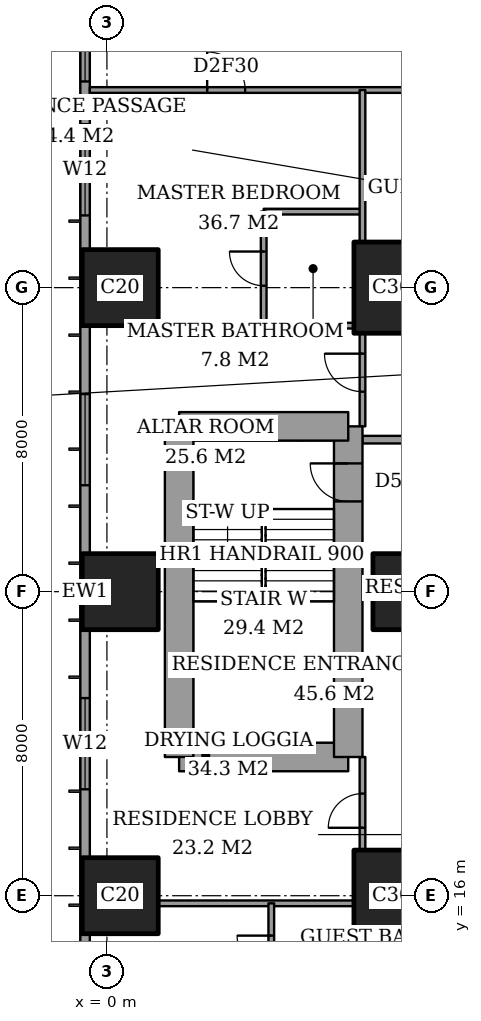
"""IFC4 building model, lengths in metres.
Left out: names, types, materials, properties, quantities, classifications, styles, units other than length and angle.
Written with IfcOpenShell. Run it as: python <this file> out.ifc"""

import sys

from ifc_helpers import new_model, si_unit, direction, frame, frame_2d, origin, origin_2d, place, context, subcontext, project, spatial, rectangle, extrude, element, fill, save


model = new_model("IFC4")
c1 = context("Model", 3, precision=1e-05, world=origin(), true_north=direction((0.0, 1.0)))
c2 = subcontext(c1, "Body", "Model", "MODEL_VIEW")
j1 = project(units=[si_unit("LENGTHUNIT", "METRE"), si_unit("PLANEANGLEUNIT", "RADIAN")], contexts=[c1])
p1 = place(None, origin())
s1 = spatial("IfcSite", under=j1, at=p1, CompositionType="ELEMENT")
p2 = place(p1, origin())
s2 = spatial("IfcBuilding", under=s1, at=p2, CompositionType="ELEMENT")
p3 = place(p2, frame((0.0, 0.0, 110.6)))
s3 = spatial("IfcBuildingStorey", under=s2, at=p3, CompositionType="ELEMENT", Elevation=110.6)
for number, where, z_axis, x_axis in (
    (1, (0.35, 16.0, 0.0), (0.0, 0.0, 1.0), (1.0, 0.0, 0.0)),
    (2, (0.35, 24.0, 0.0), (0.0, 0.0, 1.0), (1.0, 0.0, 0.0)),
    (3, (0.35, 32.0, 0.0), (0.0, 0.0, 1.0), (1.0, 0.0, 0.0)),
):
    element("IfcColumn", number, at=place(p3, frame(where, z_axis=z_axis, x_axis=x_axis)), inside=s3, PredefinedType="COLUMN", context=c2, shape_type="SweptSolid", body=[
        extrude(rectangle(XDim=2.0, YDim=2.0, at=origin_2d()), origin(), (0.0, 0.0, 1.0), 3.6),
    ])
p4 = place(p3, frame((8.0, 16.0, 0.0), z_axis=(0.0, 0.0, 1.0), x_axis=(1.0, 0.0, 0.0)))
e4 = element("IfcColumn", 4, at=p4, inside=s3, PredefinedType="COLUMN", context=c2, shape_type="SweptSolid", body=[
    extrude(rectangle(XDim=3.0, YDim=2.4, at=origin_2d()), origin(), (0.0, 0.0, 1.0), 3.6),
])
p5 = place(p3, frame((8.0, 24.0, 0.0), z_axis=(0.0, 0.0, 1.0), x_axis=(1.0, 0.0, 0.0)))
e5 = element("IfcColumn", 5, at=p5, inside=s3, PredefinedType="COLUMN", context=c2, shape_type="SweptSolid", body=[
    extrude(rectangle(XDim=2.0, YDim=2.0, at=origin_2d()), origin(), (0.0, 0.0, 1.0), 3.6),
])
p6 = place(p3, frame((8.0, 32.0, 0.0), z_axis=(0.0, 0.0, 1.0), x_axis=(1.0, 0.0, 0.0)))
e6 = element("IfcColumn", 6, at=p6, inside=s3, PredefinedType="COLUMN", context=c2, shape_type="SweptSolid", body=[
    extrude(rectangle(XDim=3.0, YDim=2.4, at=origin_2d()), origin(), (0.0, 0.0, 1.0), 3.6),
])
p7 = place(p3, frame((1.9, 19.65, 0.0), z_axis=(0.0, 0.0, 1.0), x_axis=(1.0, 0.0, 0.0)))
e7 = element("IfcWall", 7, at=p7, inside=s3, PredefinedType="SHEAR", context=c2, shape_type="SweptSolid", body=[
    extrude(rectangle(XDim=4.45, YDim=0.75, at=frame_2d((2.225, 0.0))), origin(), (0.0, 0.0, 1.0), 3.6),
])
p8 = place(p3, frame((6.35, 19.65, 0.0), z_axis=(0.0, 0.0, 1.0), x_axis=(0.0, 1.0, 0.0)))
e8 = element("IfcWall", 8, at=p8, inside=s3, PredefinedType="SHEAR", context=c2, shape_type="SweptSolid", body=[
    extrude(rectangle(XDim=8.7, YDim=0.75, at=frame_2d((4.35, 0.0))), origin(), (0.0, 0.0, 1.0), 3.6),
])
p9 = place(p8, frame((6.725, 0.0, 0.0)))
e9 = element("IfcOpeningElement", 9, at=p9, cuts=e8, PredefinedType="OPENING", context=c2, shape_type="SweptSolid", body=[
    extrude(rectangle(XDim=1.0, YDim=2.1, at=frame_2d((0.5, 1.05))), frame((0.0, 0.385, 0.0), z_axis=(0.0, -1.0, 0.0), x_axis=(1.0, 0.0, 0.0)), (0.0, 0.0, 1.0), 0.77),
])
p10 = place(p3, frame((6.35, 28.35, 0.0), z_axis=(0.0, 0.0, 1.0), x_axis=(-1.0, 0.0, 0.0)))
e10 = element("IfcWall", 10, at=p10, inside=s3, PredefinedType="SHEAR", context=c2, shape_type="SweptSolid", body=[
    extrude(rectangle(XDim=4.45, YDim=0.75, at=frame_2d((2.225, 0.0))), origin(), (0.0, 0.0, 1.0), 3.6),
])
p11 = place(p3, frame((1.9, 28.35, 0.0), z_axis=(0.0, 0.0, 1.0), x_axis=(0.0, -1.0, 0.0)))
e11 = element("IfcWall", 11, at=p11, inside=s3, PredefinedType="SHEAR", context=c2, shape_type="SweptSolid", body=[
    extrude(rectangle(XDim=8.7, YDim=0.75, at=frame_2d((4.35, 0.0))), origin(), (0.0, 0.0, 1.0), 3.6),
])
p12 = place(p3, frame((-0.575, 44.825, 0.0), z_axis=(0.0, 0.0, 1.0), x_axis=(0.0, -1.0, 0.0)))
e12 = element("IfcWall", 12, at=p12, inside=s3, PredefinedType="SOLIDWALL", context=c2, shape_type="SweptSolid", body=[
    extrude(rectangle(XDim=41.65, YDim=0.25, at=frame_2d((20.825, 0.0))), origin(), (0.0, 0.0, 1.0), 3.6),
])
p13 = place(p12, frame((0.775, 0.0, 0.4)))
e13 = element("IfcOpeningElement", 13, at=p13, cuts=e12, PredefinedType="OPENING", context=c2, shape_type="SweptSolid", body=[
    extrude(rectangle(XDim=2.4, YDim=2.2, at=frame_2d((1.2, 1.1))), frame((0.0, 0.135, 0.0), z_axis=(0.0, -1.0, 0.0), x_axis=(1.0, 0.0, 0.0)), (0.0, 0.0, 1.0), 0.27),
])
p14 = place(p12, frame((6.2, 0.0, 0.4)))
e14 = element("IfcOpeningElement", 14, at=p14, cuts=e12, PredefinedType="OPENING", context=c2, shape_type="SweptSolid", body=[
    extrude(rectangle(XDim=1.2, YDim=2.2, at=frame_2d((0.6, 1.1))), frame((0.0, 0.135, 0.0), z_axis=(0.0, -1.0, 0.0), x_axis=(1.0, 0.0, 0.0)), (0.0, 0.0, 1.0), 0.27),
])
p15 = place(p12, frame((8.525, 0.0, 0.4)))
e15 = element("IfcOpeningElement", 15, at=p15, cuts=e12, PredefinedType="OPENING", context=c2, shape_type="SweptSolid", body=[
    extrude(rectangle(XDim=2.4, YDim=2.2, at=frame_2d((1.2, 1.1))), frame((0.0, 0.135, 0.0), z_axis=(0.0, -1.0, 0.0), x_axis=(1.0, 0.0, 0.0)), (0.0, 0.0, 1.0), 0.27),
])
p16 = place(p12, frame((15.625, 0.0, 0.4)))
e16 = element("IfcOpeningElement", 16, at=p16, cuts=e12, PredefinedType="OPENING", context=c2, shape_type="SweptSolid", body=[
    extrude(rectangle(XDim=2.4, YDim=2.2, at=frame_2d((1.2, 1.1))), frame((0.0, 0.135, 0.0), z_axis=(0.0, -1.0, 0.0), x_axis=(1.0, 0.0, 0.0)), (0.0, 0.0, 1.0), 0.27),
])
p17 = place(p12, frame((23.625, 0.0, 0.4)))
e17 = element("IfcOpeningElement", 17, at=p17, cuts=e12, PredefinedType="OPENING", context=c2, shape_type="SweptSolid", body=[
    extrude(rectangle(XDim=2.4, YDim=2.2, at=frame_2d((1.2, 1.1))), frame((0.0, 0.135, 0.0), z_axis=(0.0, -1.0, 0.0), x_axis=(1.0, 0.0, 0.0)), (0.0, 0.0, 1.0), 0.27),
])
p18 = place(p12, frame((30.825, 0.0, 0.4)))
e18 = element("IfcOpeningElement", 18, at=p18, cuts=e12, PredefinedType="OPENING", context=c2, shape_type="SweptSolid", body=[
    extrude(rectangle(XDim=2.4, YDim=2.2, at=frame_2d((1.2, 1.1))), frame((0.0, 0.135, 0.0), z_axis=(0.0, -1.0, 0.0), x_axis=(1.0, 0.0, 0.0)), (0.0, 0.0, 1.0), 0.27),
])
p19 = place(p12, frame((34.5, 0.0, 0.4)))
e19 = element("IfcOpeningElement", 19, at=p19, cuts=e12, PredefinedType="OPENING", context=c2, shape_type="SweptSolid", body=[
    extrude(rectangle(XDim=1.2, YDim=2.2, at=frame_2d((0.6, 1.1))), frame((0.0, 0.135, 0.0), z_axis=(0.0, -1.0, 0.0), x_axis=(1.0, 0.0, 0.0)), (0.0, 0.0, 1.0), 0.27),
])
p20 = place(p12, frame((38.475, 0.0, 0.4)))
e20 = element("IfcOpeningElement", 20, at=p20, cuts=e12, PredefinedType="OPENING", context=c2, shape_type="SweptSolid", body=[
    extrude(rectangle(XDim=2.4, YDim=2.2, at=frame_2d((1.2, 1.1))), frame((0.0, 0.135, 0.0), z_axis=(0.0, -1.0, 0.0), x_axis=(1.0, 0.0, 0.0)), (0.0, 0.0, 1.0), 0.27),
])
p21 = place(p3, frame((1.35, 15.8, 0.0), z_axis=(0.0, 0.0, 1.0), x_axis=(1.0, 0.0, 0.0)))
e21 = element("IfcWall", 21, at=p21, inside=s3, PredefinedType="PARTITIONING", context=c2, shape_type="SweptSolid", body=[
    extrude(rectangle(XDim=5.15, YDim=0.15, at=frame_2d((2.575, 0.0))), origin(), (0.0, 0.0, 1.0), 3.35),
])
p22 = place(p3, frame((6.725, 28.0, 0.0), z_axis=(0.0, 0.0, 1.0), x_axis=(1.0, 0.0, 0.0)))
e22 = element("IfcWall", 22, at=p22, inside=s3, PredefinedType="PARTITIONING", context=c2, shape_type="SweptSolid", body=[
    extrude(rectangle(XDim=17.275, YDim=0.2, at=frame_2d((8.637, 0.0))), origin(), (0.0, 0.0, 1.0), 3.35),
])
p23 = place(p22, frame((7.175, 0.0, 0.0)))
e23 = element("IfcOpeningElement", 23, at=p23, cuts=e22, PredefinedType="OPENING", context=c2, shape_type="SweptSolid", body=[
    extrude(rectangle(XDim=1.2, YDim=2.4, at=frame_2d((0.6, 1.2))), frame((0.0, 0.11, 0.0), z_axis=(0.0, -1.0, 0.0), x_axis=(1.0, 0.0, 0.0)), (0.0, 0.0, 1.0), 0.22),
])
p24 = place(p3, frame((1.35, 31.0, 0.0), z_axis=(0.0, 0.0, 1.0), x_axis=(1.0, 0.0, 0.0)))
e24 = element("IfcWall", 24, at=p24, inside=s3, PredefinedType="PARTITIONING", context=c2, shape_type="SweptSolid", body=[
    extrude(rectangle(XDim=5.15, YDim=0.15, at=frame_2d((2.575, 0.0))), origin(), (0.0, 0.0, 1.0), 3.35),
])
p25 = place(p3, frame((4.125, 34.0, 0.0), z_axis=(0.0, 0.0, 1.0), x_axis=(1.0, 0.0, 0.0)))
e25 = element("IfcWall", 25, at=p25, inside=s3, PredefinedType="PARTITIONING", context=c2, shape_type="SweptSolid", body=[
    extrude(rectangle(XDim=2.6, YDim=0.15, at=frame_2d((1.3, 0.0))), origin(), (0.0, 0.0, 1.0), 3.35),
])
p26 = place(p3, frame((-0.45, 37.2, 0.0), z_axis=(0.0, 0.0, 1.0), x_axis=(1.0, 0.0, 0.0)))
e26 = element("IfcWall", 26, at=p26, inside=s3, PredefinedType="PARTITIONING", context=c2, shape_type="SweptSolid", body=[
    extrude(rectangle(XDim=25.011, YDim=0.15, at=frame_2d((12.505, 0.0))), origin(), (0.0, 0.0, 1.0), 3.35),
])
p27 = place(p26, frame((12.05, 0.0, 0.0)))
e27 = element("IfcOpeningElement", 27, at=p27, cuts=e26, PredefinedType="OPENING", context=c2, shape_type="SweptSolid", body=[
    extrude(rectangle(XDim=1.0, YDim=2.1, at=frame_2d((0.5, 1.05))), frame((0.0, 0.085, 0.0), z_axis=(0.0, -1.0, 0.0), x_axis=(1.0, 0.0, 0.0)), (0.0, 0.0, 1.0), 0.17),
])
p28 = place(p26, frame((3.087, 0.0, 0.0)))
e28 = element("IfcOpeningElement", 28, at=p28, cuts=e26, PredefinedType="OPENING", context=c2, shape_type="SweptSolid", body=[
    extrude(rectangle(XDim=1.0, YDim=2.1, at=frame_2d((0.5, 1.05))), frame((0.0, 0.085, 0.0), z_axis=(0.0, -1.0, 0.0), x_axis=(1.0, 0.0, 0.0)), (0.0, 0.0, 1.0), 0.17),
])
p29 = place(p26, frame((8.863, 0.0, 0.0)))
e29 = element("IfcOpeningElement", 29, at=p29, cuts=e26, PredefinedType="OPENING", context=c2, shape_type="SweptSolid", body=[
    extrude(rectangle(XDim=0.9, YDim=2.1, at=frame_2d((0.45, 1.05))), frame((0.0, 0.085, 0.0), z_axis=(0.0, -1.0, 0.0), x_axis=(1.0, 0.0, 0.0)), (0.0, 0.0, 1.0), 0.17),
])
p30 = place(p26, frame((15.55, 0.0, 0.0)))
e30 = element("IfcOpeningElement", 30, at=p30, cuts=e26, PredefinedType="OPENING", context=c2, shape_type="SweptSolid", body=[
    extrude(rectangle(XDim=1.0, YDim=2.1, at=frame_2d((0.5, 1.05))), frame((0.0, 0.085, 0.0), z_axis=(0.0, -1.0, 0.0), x_axis=(1.0, 0.0, 0.0)), (0.0, 0.0, 1.0), 0.17),
])
p31 = place(p26, frame((21.175, 0.0, 0.0)))
e31 = element("IfcOpeningElement", 31, at=p31, cuts=e26, PredefinedType="OPENING", context=c2, shape_type="SweptSolid", body=[
    extrude(rectangle(XDim=1.0, YDim=2.1, at=frame_2d((0.5, 1.05))), frame((0.0, 0.085, 0.0), z_axis=(0.0, -1.0, 0.0), x_axis=(1.0, 0.0, 0.0)), (0.0, 0.0, 1.0), 0.17),
])
p32 = place(p3, frame((4.125, 31.0, 0.0), z_axis=(0.0, 0.0, 1.0), x_axis=(0.0, 1.0, 0.0)))
e32 = element("IfcWall", 32, at=p32, inside=s3, PredefinedType="PARTITIONING", context=c2, shape_type="SweptSolid", body=[
    extrude(rectangle(XDim=3.0, YDim=0.15, at=frame_2d((1.5, 0.0))), origin(), (0.0, 0.0, 1.0), 3.35),
])
p33 = place(p32, frame((1.05, 0.0, 0.0)))
e33 = element("IfcOpeningElement", 33, at=p33, cuts=e32, PredefinedType="OPENING", context=c2, shape_type="SweptSolid", body=[
    extrude(rectangle(XDim=0.9, YDim=2.1, at=frame_2d((0.45, 1.05))), frame((0.0, 0.085, 0.0), z_axis=(0.0, -1.0, 0.0), x_axis=(1.0, 0.0, 0.0)), (0.0, 0.0, 1.0), 0.17),
])
p34 = place(p3, frame((4.325, 13.2, 0.0), z_axis=(0.0, 0.0, 1.0), x_axis=(0.0, 1.0, 0.0)))
e34 = element("IfcWall", 34, at=p34, inside=s3, PredefinedType="PARTITIONING", context=c2, shape_type="SweptSolid", body=[
    extrude(rectangle(XDim=2.6, YDim=0.15, at=frame_2d((1.3, 0.0))), origin(), (0.0, 0.0, 1.0), 3.35),
])
p35 = place(p34, frame((0.85, 0.0, 0.0)))
e35 = element("IfcOpeningElement", 35, at=p35, cuts=e34, PredefinedType="OPENING", context=c2, shape_type="SweptSolid", body=[
    extrude(rectangle(XDim=0.9, YDim=2.1, at=frame_2d((0.45, 1.05))), frame((0.0, 0.085, 0.0), z_axis=(0.0, -1.0, 0.0), x_axis=(1.0, 0.0, 0.0)), (0.0, 0.0, 1.0), 0.17),
])
p36 = place(p3, frame((6.725, 10.6, 0.0), z_axis=(0.0, 0.0, 1.0), x_axis=(0.0, 1.0, 0.0)))
e36 = element("IfcWall", 36, at=p36, inside=s3, PredefinedType="PARTITIONING", context=c2, shape_type="SweptSolid", body=[
    extrude(rectangle(XDim=4.2, YDim=0.15, at=frame_2d((2.1, 0.0))), origin(), (0.0, 0.0, 1.0), 3.35),
])
p37 = place(p3, frame((6.725, 17.2, 0.0), z_axis=(0.0, 0.0, 1.0), x_axis=(0.0, 1.0, 0.0)))
e37 = element("IfcWall", 37, at=p37, inside=s3, PredefinedType="PARTITIONING", context=c2, shape_type="SweptSolid", body=[
    extrude(rectangle(XDim=2.45, YDim=0.15, at=frame_2d((1.225, 0.0))), origin(), (0.0, 0.0, 1.0), 3.35),
])
p38 = place(p37, frame((0.587, 0.0, 0.0)))
e38 = element("IfcOpeningElement", 38, at=p38, cuts=e37, PredefinedType="OPENING", context=c2, shape_type="SweptSolid", body=[
    extrude(rectangle(XDim=0.9, YDim=2.1, at=frame_2d((0.45, 1.05))), frame((0.0, 0.085, 0.0), z_axis=(0.0, -1.0, 0.0), x_axis=(1.0, 0.0, 0.0)), (0.0, 0.0, 1.0), 0.17),
])
p39 = place(p3, frame((6.725, 28.35, 0.0), z_axis=(0.0, 0.0, 1.0), x_axis=(0.0, 1.0, 0.0)))
e39 = element("IfcWall", 39, at=p39, inside=s3, PredefinedType="PARTITIONING", context=c2, shape_type="SweptSolid", body=[
    extrude(rectangle(XDim=2.45, YDim=0.15, at=frame_2d((1.225, 0.0))), origin(), (0.0, 0.0, 1.0), 3.35),
])
p40 = place(p39, frame((0.913, 0.0, 0.0)))
e40 = element("IfcOpeningElement", 40, at=p40, cuts=e39, PredefinedType="OPENING", context=c2, shape_type="SweptSolid", body=[
    extrude(rectangle(XDim=1.0, YDim=2.1, at=frame_2d((0.5, 1.05))), frame((0.0, 0.085, 0.0), z_axis=(0.0, -1.0, 0.0), x_axis=(1.0, 0.0, 0.0)), (0.0, 0.0, 1.0), 0.17),
])
p41 = place(p3, frame((6.725, 33.2, 0.0), z_axis=(0.0, 0.0, 1.0), x_axis=(0.0, 1.0, 0.0)))
e41 = element("IfcWall", 41, at=p41, inside=s3, PredefinedType="PARTITIONING", context=c2, shape_type="SweptSolid", body=[
    extrude(rectangle(XDim=4.0, YDim=0.15, at=frame_2d((2.0, 0.0))), origin(), (0.0, 0.0, 1.0), 3.35),
])
p42 = place(p14, origin())
e42 = element("IfcWindow", 42, at=p42, inside=s3, PartitioningType="SINGLE_PANEL", PredefinedType="WINDOW", context=c2, shape_type="SweptSolid", body=[
    extrude(rectangle(XDim=1.2, YDim=2.2, at=frame_2d((0.6, 1.1))), frame((0.0, 0.03, 0.0), z_axis=(0.0, -1.0, 0.0), x_axis=(1.0, 0.0, 0.0)), (0.0, 0.0, 1.0), 0.06),
])
fill(e14, e42)
p43 = place(p15, origin())
e43 = element("IfcWindow", 43, at=p43, inside=s3, PartitioningType="SINGLE_PANEL", PredefinedType="WINDOW", context=c2, shape_type="SweptSolid", body=[
    extrude(rectangle(XDim=2.4, YDim=2.2, at=frame_2d((1.2, 1.1))), frame((0.0, 0.03, 0.0), z_axis=(0.0, -1.0, 0.0), x_axis=(1.0, 0.0, 0.0)), (0.0, 0.0, 1.0), 0.06),
])
fill(e15, e43)
p44 = place(p16, origin())
e44 = element("IfcWindow", 44, at=p44, inside=s3, PartitioningType="SINGLE_PANEL", PredefinedType="WINDOW", context=c2, shape_type="SweptSolid", body=[
    extrude(rectangle(XDim=2.4, YDim=2.2, at=frame_2d((1.2, 1.1))), frame((0.0, 0.03, 0.0), z_axis=(0.0, -1.0, 0.0), x_axis=(1.0, 0.0, 0.0)), (0.0, 0.0, 1.0), 0.06),
])
fill(e16, e44)
p45 = place(p17, origin())
e45 = element("IfcWindow", 45, at=p45, inside=s3, PartitioningType="SINGLE_PANEL", PredefinedType="WINDOW", context=c2, shape_type="SweptSolid", body=[
    extrude(rectangle(XDim=2.4, YDim=2.2, at=frame_2d((1.2, 1.1))), frame((0.0, 0.03, 0.0), z_axis=(0.0, -1.0, 0.0), x_axis=(1.0, 0.0, 0.0)), (0.0, 0.0, 1.0), 0.06),
])
fill(e17, e45)
p46 = place(p35, origin())
e46 = element("IfcDoor", 46, at=p46, inside=s3, OperationType="SINGLE_SWING_LEFT", PredefinedType="DOOR", context=c2, shape_type="SweptSolid", body=[
    extrude(rectangle(XDim=0.9, YDim=2.1, at=frame_2d((0.45, 1.05))), frame((0.0, 0.025, 0.0), z_axis=(0.0, -1.0, 0.0), x_axis=(1.0, 0.0, 0.0)), (0.0, 0.0, 1.0), 0.05),
])
fill(e35, e46)
p47 = place(p38, origin())
e47 = element("IfcDoor", 47, at=p47, inside=s3, OperationType="SINGLE_SWING_RIGHT", PredefinedType="DOOR", context=c2, shape_type="SweptSolid", body=[
    extrude(rectangle(XDim=0.9, YDim=2.1, at=frame_2d((0.45, 1.05))), frame((0.0, 0.025, 0.0), z_axis=(0.0, -1.0, 0.0), x_axis=(1.0, 0.0, 0.0)), (0.0, 0.0, 1.0), 0.05),
])
fill(e38, e47)
p48 = place(p33, origin())
e48 = element("IfcDoor", 48, at=p48, inside=s3, OperationType="SINGLE_SWING_LEFT", PredefinedType="DOOR", context=c2, shape_type="SweptSolid", body=[
    extrude(rectangle(XDim=0.9, YDim=2.1, at=frame_2d((0.45, 1.05))), frame((0.0, 0.025, 0.0), z_axis=(0.0, -1.0, 0.0), x_axis=(1.0, 0.0, 0.0)), (0.0, 0.0, 1.0), 0.05),
])
fill(e33, e48)
p49 = place(p28, origin())
e49 = element("IfcDoor", 49, at=p49, inside=s3, OperationType="SINGLE_SWING_RIGHT", PredefinedType="DOOR", context=c2, shape_type="SweptSolid", body=[
    extrude(rectangle(XDim=1.0, YDim=2.1, at=frame_2d((0.5, 1.05))), frame((0.0, 0.025, 0.0), z_axis=(0.0, -1.0, 0.0), x_axis=(1.0, 0.0, 0.0)), (0.0, 0.0, 1.0), 0.05),
])
fill(e28, e49)
p50 = place(p40, origin())
e50 = element("IfcDoor", 50, at=p50, inside=s3, OperationType="SINGLE_SWING_LEFT", PredefinedType="DOOR", context=c2, shape_type="SweptSolid", body=[
    extrude(rectangle(XDim=1.0, YDim=2.1, at=frame_2d((0.5, 1.05))), frame((0.0, 0.025, 0.0), z_axis=(0.0, -1.0, 0.0), x_axis=(1.0, 0.0, 0.0)), (0.0, 0.0, 1.0), 0.05),
])
fill(e40, e50)
p51 = place(p9, origin())
e51 = element("IfcDoor", 51, at=p51, inside=s3, OperationType="SINGLE_SWING_LEFT", PredefinedType="DOOR", context=c2, shape_type="SweptSolid", body=[
    extrude(rectangle(XDim=1.0, YDim=2.1, at=frame_2d((0.5, 1.05))), frame((0.0, 0.025, 0.0), z_axis=(0.0, -1.0, 0.0), x_axis=(1.0, 0.0, 0.0)), (0.0, 0.0, 1.0), 0.05),
])
fill(e9, e51)
save(model, sys.argv[1])
